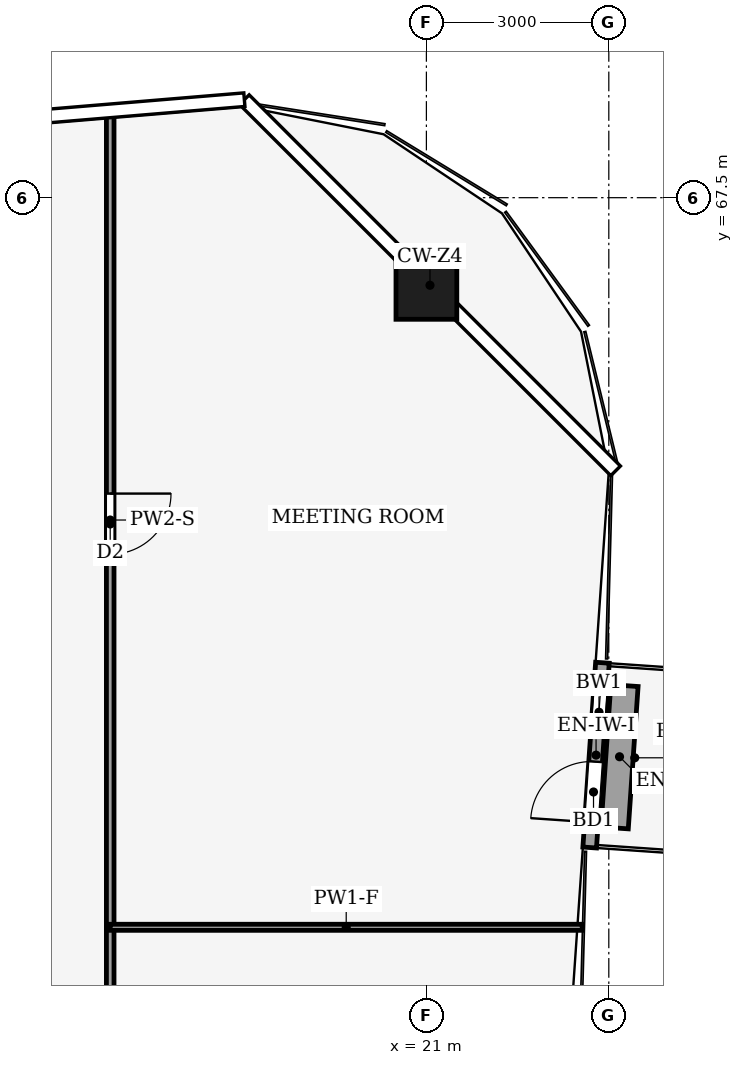
"""IFC4 building model, lengths in metres.
Left out: names, types, materials, properties, quantities, classifications, styles, units other than length and angle.
Written with IfcOpenShell. Run it as: python <this file> out.ifc"""

import sys

from ifc_helpers import new_model, si_unit, direction, frame, frame_2d, origin, origin_2d, place, context, subcontext, project, spatial, rectangle, hollow_rectangle, extrude, element, fill, save


model = new_model("IFC4")
c1 = context("Model", 3, precision=1e-05, world=origin(), true_north=direction((0.0, 1.0)))
c2 = subcontext(c1, "Body", "Model", "MODEL_VIEW")
j1 = project(units=[si_unit("LENGTHUNIT", "METRE"), si_unit("PLANEANGLEUNIT", "RADIAN")], contexts=[c1])
p1 = place(None, origin())
s1 = spatial("IfcSite", under=j1, at=p1, CompositionType="ELEMENT")
p2 = place(p1, origin())
s2 = spatial("IfcBuilding", under=s1, at=p2, CompositionType="ELEMENT")
p3 = place(p2, frame((0.0, 0.0, 266.0)))
s3 = spatial("IfcBuildingStorey", under=s2, at=p3, CompositionType="ELEMENT", Elevation=266.0)
p4 = place(p3, frame((21.0, 66.0, 0.0), z_axis=(0.0, 0.0, 1.0), x_axis=(1.0, 0.0, 0.0)))
e1 = element("IfcColumn", 1, at=p4, inside=s3, PredefinedType="COLUMN", context=c2, shape_type="SweptSolid", body=[
    extrude(hollow_rectangle(XDim=1.0, YDim=1.0, WallThickness=0.045, at=origin_2d()), origin(), (0.0, 0.0, 1.0), 4.0),
])
p5 = place(p3, frame((23.686, 56.812, 0.0), z_axis=(0.0, 0.0, 1.0), x_axis=(0.06875808698, 0.99763336225, 0.0)))
e2 = element("IfcWall", 2, at=p5, inside=s3, PredefinedType="SOLIDWALL", context=c2, shape_type="SweptSolid", body=[
    extrude(rectangle(XDim=3.047, YDim=0.224, at=frame_2d((1.523, 0.0))), origin(), (0.0, 0.0, 1.0), 3.65),
])
p6 = place(p5, frame((0.416, 0.0, 0.0)))
e3 = element("IfcOpeningElement", 3, at=p6, cuts=e2, PredefinedType="OPENING", context=c2, shape_type="SweptSolid", body=[
    extrude(rectangle(XDim=1.0, YDim=2.1, at=frame_2d((0.5, 1.05))), frame((0.0, 0.122, 0.0), z_axis=(0.0, -1.0, 0.0), x_axis=(1.0, 0.0, 0.0)), (0.0, 0.0, 1.0), 0.244),
])
p7 = place(p5, frame((1.831, 0.0, 0.9)))
e4 = element("IfcOpeningElement", 4, at=p7, cuts=e2, PredefinedType="OPENING", context=c2, shape_type="SweptSolid", body=[
    extrude(rectangle(XDim=0.8, YDim=1.2, at=frame_2d((0.4, 0.6))), frame((0.0, 0.122, 0.0), z_axis=(0.0, -1.0, 0.0), x_axis=(1.0, 0.0, 0.0)), (0.0, 0.0, 1.0), 0.244),
])
p8 = place(p3, frame((24.096, 57.135, 0.0), z_axis=(0.0, 0.0, 1.0), x_axis=(0.06877709495, 0.997632052016, 0.0)))
e5 = element("IfcWall", 5, at=p8, inside=s3, PredefinedType="USERDEFINED", context=c2, shape_type="SweptSolid", body=[
    extrude(rectangle(XDim=2.346, YDim=0.45, at=frame_2d((1.173, 0.0))), origin(), (0.0, 0.0, 1.0), 0.4),
])
p9 = place(p3, frame((15.8, 55.5, 0.0), z_axis=(0.0, 0.0, 1.0), x_axis=(0.0, -1.0, 0.0)))
e6 = element("IfcWall", 6, at=p9, inside=s3, PredefinedType="PARTITIONING", context=c2, shape_type="SweptSolid", body=[
    extrude(rectangle(XDim=9.0, YDim=0.125, at=frame_2d((4.5, 0.0))), origin(), (0.0, 0.0, 1.0), 3.24),
])
p10 = place(p9, frame((4.0, 0.0, 0.0)))
e7 = element("IfcOpeningElement", 7, at=p10, cuts=e6, PredefinedType="OPENING", context=c2, shape_type="SweptSolid", body=[
    extrude(rectangle(XDim=1.0, YDim=2.1, at=frame_2d((0.5, 1.05))), frame((0.0, 0.073, 0.0), z_axis=(0.0, -1.0, 0.0), x_axis=(1.0, 0.0, 0.0)), (0.0, 0.0, 1.0), 0.145),
])
p11 = place(p3, frame((15.8, 68.897, 0.0), z_axis=(0.0, 0.0, 1.0), x_axis=(0.0, -1.0, 0.0)))
e8 = element("IfcWall", 8, at=p11, inside=s3, PredefinedType="PARTITIONING", context=c2, shape_type="SweptSolid", body=[
    extrude(rectangle(XDim=13.397, YDim=0.125, at=frame_2d((6.698, 0.0))), origin(), (0.0, 0.0, 1.0), 3.04),
])
p12 = place(p11, frame((6.263, 0.0, 0.0)))
e9 = element("IfcOpeningElement", 9, at=p12, cuts=e8, PredefinedType="OPENING", context=c2, shape_type="SweptSolid", body=[
    extrude(rectangle(XDim=1.0, YDim=2.1, at=frame_2d((0.5, 1.05))), frame((0.0, 0.073, 0.0), z_axis=(0.0, -1.0, 0.0), x_axis=(1.0, 0.0, 0.0)), (0.0, 0.0, 1.0), 0.145),
])
p13 = place(p3, frame((23.563, 55.5, 0.0), z_axis=(0.0, 0.0, 1.0), x_axis=(-1.0, 0.0, 0.0)))
e10 = element("IfcWall", 10, at=p13, inside=s3, PredefinedType="PARTITIONING", context=c2, shape_type="SweptSolid", body=[
    extrude(rectangle(XDim=7.763, YDim=0.1, at=frame_2d((3.881, 0.0))), origin(), (0.0, 0.0, 1.0), 3.04),
])
p14 = place(p6, origin())
e11 = element("IfcDoor", 11, at=p14, inside=s3, OperationType="SINGLE_SWING_LEFT", PredefinedType="DOOR", context=c2, shape_type="SweptSolid", body=[
    extrude(rectangle(XDim=1.0, YDim=2.1, at=frame_2d((0.5, 1.05))), frame((0.0, 0.025, 0.0), z_axis=(0.0, -1.0, 0.0), x_axis=(1.0, 0.0, 0.0)), (0.0, 0.0, 1.0), 0.05),
])
fill(e3, e11)
p15 = place(p7, origin())
e12 = element("IfcWindow", 12, at=p15, inside=s3, PartitioningType="SINGLE_PANEL", PredefinedType="WINDOW", context=c2, shape_type="SweptSolid", body=[
    extrude(rectangle(XDim=0.8, YDim=1.2, at=frame_2d((0.4, 0.6))), frame((0.0, 0.03, 0.0), z_axis=(0.0, -1.0, 0.0), x_axis=(1.0, 0.0, 0.0)), (0.0, 0.0, 1.0), 0.06),
])
fill(e4, e12)
p16 = place(p12, origin())
e13 = element("IfcDoor", 13, at=p16, inside=s3, OperationType="SINGLE_SWING_RIGHT", PredefinedType="DOOR", context=c2, shape_type="SweptSolid", body=[
    extrude(rectangle(XDim=1.0, YDim=2.1, at=frame_2d((0.5, 1.05))), frame((0.0, 0.025, 0.0), z_axis=(0.0, -1.0, 0.0), x_axis=(1.0, 0.0, 0.0)), (0.0, 0.0, 1.0), 0.05),
])
fill(e9, e13)
save(model, sys.argv[1])
